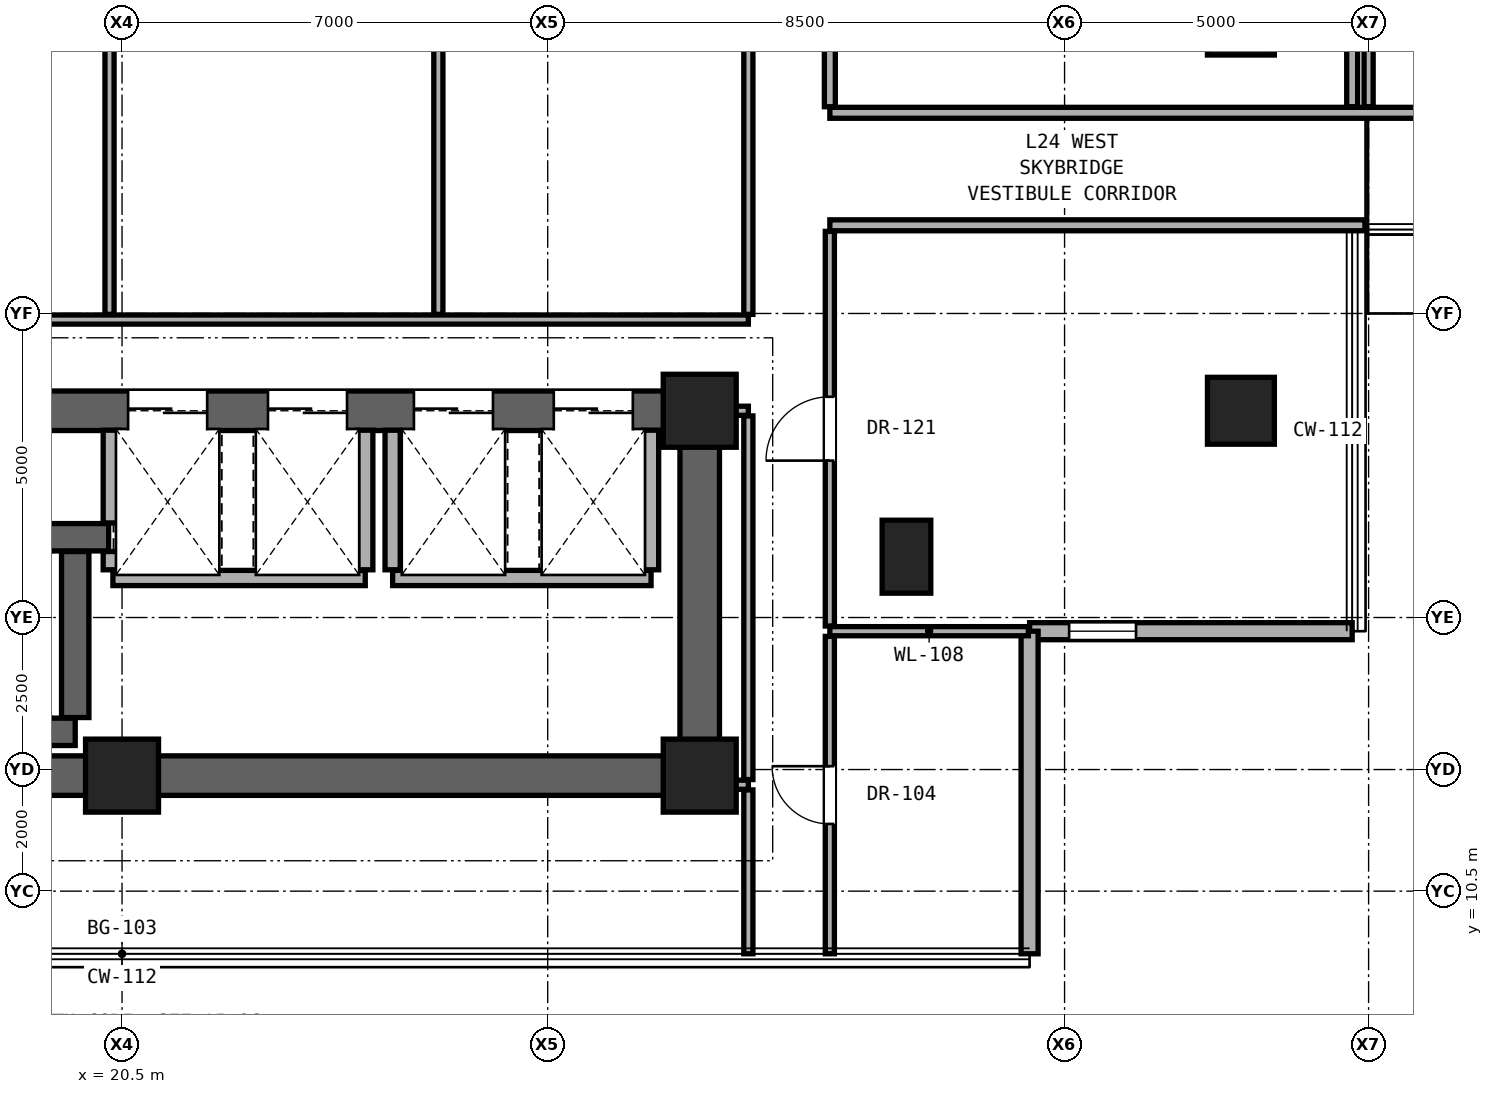
"""IFC4 building model, lengths in metres.
Left out: names, types, materials, properties, quantities, classifications, styles, units other than length and angle.
Written with IfcOpenShell. Run it as: python <this file> out.ifc"""

import sys

from ifc_helpers import new_model, si_unit, direction, frame, frame_2d, origin, origin_2d, place, context, subcontext, project, spatial, rectangle, hollow_rectangle, extrude, element, fill, save


model = new_model("IFC4")
c1 = context("Model", 3, precision=1e-05, world=origin(), true_north=direction((0.0, 1.0)))
c2 = subcontext(c1, "Body", "Model", "MODEL_VIEW")
j1 = project(units=[si_unit("LENGTHUNIT", "METRE"), si_unit("PLANEANGLEUNIT", "RADIAN")], contexts=[c1])
p1 = place(None, origin())
s1 = spatial("IfcSite", under=j1, at=p1, CompositionType="ELEMENT")
p2 = place(p1, origin())
s2 = spatial("IfcBuilding", under=s1, at=p2, CompositionType="ELEMENT")
p3 = place(p2, frame((0.0, 0.0, 88.4)))
s3 = spatial("IfcBuildingStorey", under=s2, at=p3, CompositionType="ELEMENT", Elevation=88.4)
for number, where, z_axis, x_axis in (
    (1, (20.5, 12.4, 0.0), (0.0, 0.0, 1.0), (1.0, 0.0, 0.0)),
    (2, (30.0, 12.4, 0.0), (0.0, 0.0, 1.0), (1.0, 0.0, 0.0)),
    (3, (30.0, 18.4, 0.0), (0.0, 0.0, 1.0), (1.0, 0.0, 0.0)),
):
    element("IfcColumn", number, at=place(p3, frame(where, z_axis=z_axis, x_axis=x_axis)), inside=s3, PredefinedType="COLUMN", context=c2, shape_type="SweptSolid", body=[
        extrude(rectangle(XDim=1.2, YDim=1.2, at=origin_2d()), origin(), (0.0, 0.0, 1.0), 3.3),
    ])
for number, where, z_axis, x_axis in (
    (4, (38.9, 18.4, 0.0), (0.0, 0.0, 1.0), (1.0, 0.0, 0.0)),
    (5, (38.9, 24.8, 0.0), (0.0, 0.0, 1.0), (1.0, 0.0, 0.0)),
):
    element("IfcColumn", number, at=place(p3, frame(where, z_axis=z_axis, x_axis=x_axis)), inside=s3, PredefinedType="COLUMN", context=c2, shape_type="SweptSolid", body=[
        extrude(hollow_rectangle(XDim=1.1, YDim=1.1, WallThickness=0.06, at=origin_2d()), origin(), (0.0, 0.0, 1.0), 3.3),
    ])
p4 = place(p3, frame((33.4, 16.0, 0.0), z_axis=(0.0, 0.0, 1.0), x_axis=(1.0, 0.0, 0.0)))
e6 = element("IfcColumn", 6, at=p4, inside=s3, PredefinedType="PILASTER", context=c2, shape_type="SweptSolid", body=[
    extrude(rectangle(XDim=0.8, YDim=1.2, at=origin_2d()), origin(), (0.0, 0.0, 1.0), 3.3),
])
p5 = place(p3, frame((11.0, 12.4, 0.0), z_axis=(0.0, 0.0, 1.0), x_axis=(1.0, 0.0, 0.0)))
e7 = element("IfcWall", 7, at=p5, inside=s3, PredefinedType="SHEAR", context=c2, shape_type="SweptSolid", body=[
    extrude(rectangle(XDim=19.0, YDim=0.65, at=frame_2d((9.5, 0.0))), origin(), (0.0, 0.0, 1.0), 3.08),
])
p6 = place(p3, frame((30.0, 12.4, 0.0), z_axis=(0.0, 0.0, 1.0), x_axis=(0.0, 1.0, 0.0)))
e8 = element("IfcWall", 8, at=p6, inside=s3, PredefinedType="SHEAR", context=c2, shape_type="SweptSolid", body=[
    extrude(rectangle(XDim=6.0, YDim=0.65, at=frame_2d((3.0, 0.0))), origin(), (0.0, 0.0, 1.0), 3.08),
])
p7 = place(p3, frame((11.0, 18.4, 0.0), z_axis=(0.0, 0.0, 1.0), x_axis=(1.0, 0.0, 0.0)))
e9 = element("IfcWall", 9, at=p7, inside=s3, PredefinedType="SHEAR", context=c2, shape_type="SweptSolid", body=[
    extrude(rectangle(XDim=19.0, YDim=0.65, at=frame_2d((9.5, 0.0))), origin(), (0.0, 0.0, 1.0), 3.08),
])
p8 = place(p7, frame((4.175, 0.0, 0.0)))
e10 = element("IfcOpeningElement", 10, at=p8, cuts=e9, PredefinedType="OPENING", context=c2, shape_type="SweptSolid", body=[
    extrude(rectangle(XDim=1.2, YDim=2.25, at=frame_2d((0.6, 1.125))), frame((0.0, 0.335, 0.0), z_axis=(0.0, -1.0, 0.0), x_axis=(1.0, 0.0, 0.0)), (0.0, 0.0, 1.0), 0.67),
])
p9 = place(p7, frame((9.6, 0.0, 0.0)))
e11 = element("IfcOpeningElement", 11, at=p9, cuts=e9, PredefinedType="OPENING", context=c2, shape_type="SweptSolid", body=[
    extrude(rectangle(XDim=1.3, YDim=2.3, at=frame_2d((0.65, 1.15))), frame((0.0, 0.335, 0.0), z_axis=(0.0, -1.0, 0.0), x_axis=(1.0, 0.0, 0.0)), (0.0, 0.0, 1.0), 0.67),
])
p10 = place(p7, frame((11.9, 0.0, 0.0)))
e12 = element("IfcOpeningElement", 12, at=p10, cuts=e9, PredefinedType="OPENING", context=c2, shape_type="SweptSolid", body=[
    extrude(rectangle(XDim=1.3, YDim=2.3, at=frame_2d((0.65, 1.15))), frame((0.0, 0.335, 0.0), z_axis=(0.0, -1.0, 0.0), x_axis=(1.0, 0.0, 0.0)), (0.0, 0.0, 1.0), 0.67),
])
p11 = place(p7, frame((14.3, 0.0, 0.0)))
e13 = element("IfcOpeningElement", 13, at=p11, cuts=e9, PredefinedType="OPENING", context=c2, shape_type="SweptSolid", body=[
    extrude(rectangle(XDim=1.3, YDim=2.3, at=frame_2d((0.65, 1.15))), frame((0.0, 0.335, 0.0), z_axis=(0.0, -1.0, 0.0), x_axis=(1.0, 0.0, 0.0)), (0.0, 0.0, 1.0), 0.67),
])
p12 = place(p7, frame((16.6, 0.0, 0.0)))
e14 = element("IfcOpeningElement", 14, at=p12, cuts=e9, PredefinedType="OPENING", context=c2, shape_type="SweptSolid", body=[
    extrude(rectangle(XDim=1.3, YDim=2.3, at=frame_2d((0.65, 1.15))), frame((0.0, 0.335, 0.0), z_axis=(0.0, -1.0, 0.0), x_axis=(1.0, 0.0, 0.0)), (0.0, 0.0, 1.0), 0.67),
])
p13 = place(p3, frame((35.425, 14.775, 0.0), z_axis=(0.0, 0.0, 1.0), x_axis=(1.0, 0.0, 0.0)))
e15 = element("IfcWall", 15, at=p13, inside=s3, PredefinedType="SOLIDWALL", context=c2, shape_type="SweptSolid", body=[
    extrude(rectangle(XDim=5.305, YDim=0.28, at=frame_2d((2.652, 0.0))), origin(), (0.0, 0.0, 1.0), 3.06),
])
p14 = place(p13, frame((0.65, 0.0, 0.85)))
e16 = element("IfcOpeningElement", 16, at=p14, cuts=e15, PredefinedType="OPENING", context=c2, shape_type="SweptSolid", body=[
    extrude(rectangle(XDim=1.1, YDim=2.0, at=frame_2d((0.55, 1.0))), frame((0.0, 0.15, 0.0), z_axis=(0.0, -1.0, 0.0), x_axis=(1.0, 0.0, 0.0)), (0.0, 0.0, 1.0), 0.3),
])
p15 = place(p3, frame((35.425, 9.47, 0.0), z_axis=(0.0, 0.0, 1.0), x_axis=(0.0, 1.0, 0.0)))
e17 = element("IfcWall", 17, at=p15, inside=s3, PredefinedType="SOLIDWALL", context=c2, shape_type="SweptSolid", body=[
    extrude(rectangle(XDim=5.305, YDim=0.28, at=frame_2d((2.652, 0.0))), origin(), (0.0, 0.0, 1.0), 3.06),
])
p16 = place(p3, frame((30.32, 12.25, 0.0), z_axis=(0.0, 0.0, 1.0), x_axis=(1.0, 0.0, 0.0)))
e18 = element("IfcWall", 18, at=p16, inside=s3, PredefinedType="PARTITIONING", context=c2, shape_type="SweptSolid", body=[
    extrude(rectangle(XDim=0.48, YDim=0.15, at=frame_2d((0.24, 0.0))), origin(), (0.0, 0.0, 1.0), 3.08),
])
p17 = place(p3, frame((11.32, 13.12, 0.0), z_axis=(0.0, 0.0, 1.0), x_axis=(1.0, 0.0, 0.0)))
e19 = element("IfcWall", 19, at=p17, inside=s3, PredefinedType="SHEAR", context=c2, shape_type="SweptSolid", body=[
    extrude(rectangle(XDim=8.41, YDim=0.45, at=frame_2d((4.205, 0.0))), origin(), (0.0, 0.0, 1.0), 3.08),
])
p18 = place(p3, frame((32.14, 14.775, 0.0), z_axis=(0.0, 0.0, 1.0), x_axis=(1.0, 0.0, 0.0)))
e20 = element("IfcWall", 20, at=p18, inside=s3, PredefinedType="PARTITIONING", context=c2, shape_type="SweptSolid", body=[
    extrude(rectangle(XDim=3.265, YDim=0.15, at=frame_2d((1.633, 0.0))), origin(), (0.0, 0.0, 1.0), 3.08),
])
p19 = place(p3, frame((20.35, 15.65, 0.0), z_axis=(0.0, 0.0, 1.0), x_axis=(1.0, 0.0, 0.0)))
e21 = element("IfcWall", 21, at=p19, inside=s3, PredefinedType="SOLIDWALL", context=c2, shape_type="SweptSolid", body=[
    extrude(rectangle(XDim=4.15, YDim=0.25, at=frame_2d((2.075, 0.0))), origin(), (0.0, 0.0, 1.0), 3.08),
])
p20 = place(p3, frame((24.95, 15.65, 0.0), z_axis=(0.0, 0.0, 1.0), x_axis=(1.0, 0.0, 0.0)))
e22 = element("IfcWall", 22, at=p20, inside=s3, PredefinedType="SOLIDWALL", context=c2, shape_type="SweptSolid", body=[
    extrude(rectangle(XDim=4.25, YDim=0.25, at=frame_2d((2.125, 0.0))), origin(), (0.0, 0.0, 1.0), 3.08),
])
p21 = place(p3, frame((11.32, 16.32, 0.0), z_axis=(0.0, 0.0, 1.0), x_axis=(1.0, 0.0, 0.0)))
e23 = element("IfcWall", 23, at=p21, inside=s3, PredefinedType="SHEAR", context=c2, shape_type="SweptSolid", body=[
    extrude(rectangle(XDim=8.96, YDim=0.45, at=frame_2d((4.48, 0.0))), origin(), (0.0, 0.0, 1.0), 3.08),
])
p22 = place(p21, frame((0.495, 0.0, 0.0)))
e24 = element("IfcOpeningElement", 24, at=p22, cuts=e23, PredefinedType="OPENING", context=c2, shape_type="SweptSolid", body=[
    extrude(rectangle(XDim=1.15, YDim=2.2, at=frame_2d((0.575, 1.1))), frame((0.0, 0.235, 0.0), z_axis=(0.0, -1.0, 0.0), x_axis=(1.0, 0.0, 0.0)), (0.0, 0.0, 1.0), 0.47),
])
p23 = place(p3, frame((30.32, 18.4, 0.0), z_axis=(0.0, 0.0, 1.0), x_axis=(1.0, 0.0, 0.0)))
e25 = element("IfcWall", 25, at=p23, inside=s3, PredefinedType="PARTITIONING", context=c2, shape_type="SweptSolid", body=[
    extrude(rectangle(XDim=0.48, YDim=0.15, at=frame_2d((0.24, 0.0))), origin(), (0.0, 0.0, 1.0), 2.456),
])
p24 = place(p3, frame((10.2, 19.9, 0.0), z_axis=(0.0, 0.0, 1.0), x_axis=(1.0, 0.0, 0.0)))
e26 = element("IfcWall", 26, at=p24, inside=s3, PredefinedType="PARTITIONING", context=c2, shape_type="SweptSolid", body=[
    extrude(rectangle(XDim=20.6, YDim=0.15, at=frame_2d((10.3, 0.0))), origin(), (0.0, 0.0, 1.0), 2.124),
])
p25 = place(p24, frame((1.67, 0.0, 0.0)))
e27 = element("IfcOpeningElement", 27, at=p25, cuts=e26, PredefinedType="OPENING", context=c2, shape_type="SweptSolid", body=[
    extrude(rectangle(XDim=0.9, YDim=2.1, at=frame_2d((0.45, 1.05))), frame((0.0, 0.085, 0.0), z_axis=(0.0, -1.0, 0.0), x_axis=(1.0, 0.0, 0.0)), (0.0, 0.0, 1.0), 0.17),
])
p26 = place(p24, frame((3.65, 0.0, 0.0)))
e28 = element("IfcOpeningElement", 28, at=p26, cuts=e26, PredefinedType="OPENING", context=c2, shape_type="SweptSolid", body=[
    extrude(rectangle(XDim=0.85, YDim=2.01, at=frame_2d((0.425, 1.005))), frame((0.0, 0.085, 0.0), z_axis=(0.0, -1.0, 0.0), x_axis=(1.0, 0.0, 0.0)), (0.0, 0.0, 1.0), 0.17),
])
p27 = place(p24, frame((7.197, 0.0, 0.0)))
e29 = element("IfcOpeningElement", 29, at=p27, cuts=e26, PredefinedType="OPENING", context=c2, shape_type="SweptSolid", body=[
    extrude(rectangle(XDim=0.85, YDim=2.01, at=frame_2d((0.425, 1.005))), frame((0.0, 0.085, 0.0), z_axis=(0.0, -1.0, 0.0), x_axis=(1.0, 0.0, 0.0)), (0.0, 0.0, 1.0), 0.17),
])
p28 = place(p3, frame((32.14, 21.45, 0.0), z_axis=(0.0, 0.0, 1.0), x_axis=(1.0, 0.0, 0.0)))
e30 = element("IfcWall", 30, at=p28, inside=s3, PredefinedType="PARTITIONING", context=c2, shape_type="SweptSolid", body=[
    extrude(rectangle(XDim=8.8, YDim=0.18, at=frame_2d((4.4, 0.0))), origin(), (0.0, 0.0, 1.0), 2.085),
])
p29 = place(p3, frame((32.14, 23.3, 0.0), z_axis=(0.0, 0.0, 1.0), x_axis=(1.0, 0.0, 0.0)))
e31 = element("IfcWall", 31, at=p29, inside=s3, PredefinedType="PARTITIONING", context=c2, shape_type="SweptSolid", body=[
    extrude(rectangle(XDim=33.11, YDim=0.18, at=frame_2d((16.555, 0.0))), origin(), (0.0, 0.0, 1.0), 2.145),
])
p30 = place(p29, frame((12.335, 0.0, 0.0)))
e32 = element("IfcOpeningElement", 32, at=p30, cuts=e31, PredefinedType="OPENING", context=c2, shape_type="SweptSolid", body=[
    extrude(rectangle(XDim=0.85, YDim=2.01, at=frame_2d((0.425, 1.005))), frame((0.0, 0.1, 0.0), z_axis=(0.0, -1.0, 0.0), x_axis=(1.0, 0.0, 0.0)), (0.0, 0.0, 1.0), 0.2),
])
p31 = place(p29, frame((19.504, 0.0, 0.0)))
e33 = element("IfcOpeningElement", 33, at=p31, cuts=e31, PredefinedType="OPENING", context=c2, shape_type="SweptSolid", body=[
    extrude(rectangle(XDim=0.85, YDim=2.01, at=frame_2d((0.425, 1.005))), frame((0.0, 0.1, 0.0), z_axis=(0.0, -1.0, 0.0), x_axis=(1.0, 0.0, 0.0)), (0.0, 0.0, 1.0), 0.2),
])
p32 = place(p29, frame((24.398, 0.0, 0.0)))
e34 = element("IfcOpeningElement", 34, at=p32, cuts=e31, PredefinedType="OPENING", context=c2, shape_type="SweptSolid", body=[
    extrude(rectangle(XDim=0.9, YDim=2.1, at=frame_2d((0.45, 1.05))), frame((0.0, 0.1, 0.0), z_axis=(0.0, -1.0, 0.0), x_axis=(1.0, 0.0, 0.0)), (0.0, 0.0, 1.0), 0.2),
])
p33 = place(p3, frame((19.73, 13.355, 0.0), z_axis=(0.0, 0.0, 1.0), x_axis=(0.0, 1.0, 0.0)))
e35 = element("IfcWall", 35, at=p33, inside=s3, PredefinedType="SHEAR", context=c2, shape_type="SweptSolid", body=[
    extrude(rectangle(XDim=2.73, YDim=0.45, at=frame_2d((1.365, 0.0))), origin(), (0.0, 0.0, 1.0), 3.08),
])
p34 = place(p3, frame((20.315, 15.785, 0.0), z_axis=(0.0, 0.0, 1.0), x_axis=(0.0, 1.0, 0.0)))
e36 = element("IfcWall", 36, at=p34, inside=s3, PredefinedType="SOLIDWALL", context=c2, shape_type="SweptSolid", body=[
    extrude(rectangle(XDim=0.3, YDim=0.25, at=frame_2d((0.15, 0.0))), origin(), (0.0, 0.0, 1.0), 3.08),
])
p35 = place(p3, frame((20.315, 16.555, 0.0), z_axis=(0.0, 0.0, 1.0), x_axis=(0.0, 1.0, 0.0)))
e37 = element("IfcWall", 37, at=p35, inside=s3, PredefinedType="SOLIDWALL", context=c2, shape_type="SweptSolid", body=[
    extrude(rectangle(XDim=1.525, YDim=0.25, at=frame_2d((0.763, 0.0))), origin(), (0.0, 0.0, 1.0), 3.08),
])
p36 = place(p3, frame((20.294, 19.985, 0.0), z_axis=(0.0, 0.0, 1.0), x_axis=(0.0, 1.0, 0.0)))
e38 = element("IfcWall", 38, at=p36, inside=s3, PredefinedType="PARTITIONING", context=c2, shape_type="SweptSolid", body=[
    extrude(rectangle(XDim=13.03, YDim=0.15, at=frame_2d((6.515, 0.0))), origin(), (0.0, 0.0, 1.0), 2.124),
])
for number, where, z_axis, x_axis in (
    (39, (24.5, 15.785, 0.0), (0.0, 0.0, 1.0), (0.0, 1.0, 0.0)),
    (40, (24.95, 15.785, 0.0), (0.0, 0.0, 1.0), (0.0, 1.0, 0.0)),
):
    element("IfcWall", number, at=place(p3, frame(where, z_axis=z_axis, x_axis=x_axis)), inside=s3, PredefinedType="SOLIDWALL", context=c2, shape_type="SweptSolid", body=[
        extrude(rectangle(XDim=2.295, YDim=0.25, at=frame_2d((1.147, 0.0))), origin(), (0.0, 0.0, 1.0), 3.08),
    ])
p37 = place(p3, frame((25.702, 19.985, 0.0), z_axis=(0.0, 0.0, 1.0), x_axis=(0.0, 1.0, 0.0)))
e41 = element("IfcWall", 41, at=p37, inside=s3, PredefinedType="PARTITIONING", context=c2, shape_type="SweptSolid", body=[
    extrude(rectangle(XDim=13.03, YDim=0.15, at=frame_2d((6.515, 0.0))), origin(), (0.0, 0.0, 1.0), 2.124),
])
p38 = place(p3, frame((29.2, 15.785, 0.0), z_axis=(0.0, 0.0, 1.0), x_axis=(0.0, 1.0, 0.0)))
e42 = element("IfcWall", 42, at=p38, inside=s3, PredefinedType="SOLIDWALL", context=c2, shape_type="SweptSolid", body=[
    extrude(rectangle(XDim=2.295, YDim=0.25, at=frame_2d((1.147, 0.0))), origin(), (0.0, 0.0, 1.0), 3.08),
])
p39 = place(p3, frame((30.8, 9.47, 0.0), z_axis=(0.0, 0.0, 1.0), x_axis=(0.0, 1.0, 0.0)))
e43 = element("IfcWall", 43, at=p39, inside=s3, PredefinedType="PARTITIONING", context=c2, shape_type="SweptSolid", body=[
    extrude(rectangle(XDim=2.695, YDim=0.15, at=frame_2d((1.348, 0.0))), origin(), (0.0, 0.0, 1.0), 3.08),
])
p40 = place(p3, frame((30.8, 12.335, 0.0), z_axis=(0.0, 0.0, 1.0), x_axis=(0.0, 1.0, 0.0)))
e44 = element("IfcWall", 44, at=p40, inside=s3, PredefinedType="PARTITIONING", context=c2, shape_type="SweptSolid", body=[
    extrude(rectangle(XDim=5.98, YDim=0.15, at=frame_2d((2.99, 0.0))), origin(), (0.0, 0.0, 1.0), 2.456),
])
p41 = place(p3, frame((30.8, 19.985, 0.0), z_axis=(0.0, 0.0, 1.0), x_axis=(0.0, 1.0, 0.0)))
e45 = element("IfcWall", 45, at=p41, inside=s3, PredefinedType="PARTITIONING", context=c2, shape_type="SweptSolid", body=[
    extrude(rectangle(XDim=13.03, YDim=0.15, at=frame_2d((6.515, 0.0))), origin(), (0.0, 0.0, 1.0), 2.299),
])
p42 = place(p3, frame((32.14, 9.47, 0.0), z_axis=(0.0, 0.0, 1.0), x_axis=(0.0, 1.0, 0.0)))
e46 = element("IfcWall", 46, at=p42, inside=s3, PredefinedType="PARTITIONING", context=c2, shape_type="SweptSolid", body=[
    extrude(rectangle(XDim=5.22, YDim=0.15, at=frame_2d((2.61, 0.0))), origin(), (0.0, 0.0, 1.0), 3.08),
])
p43 = place(p42, frame((2.135, 0.0, 0.0)))
e47 = element("IfcOpeningElement", 47, at=p43, cuts=e46, PredefinedType="OPENING", context=c2, shape_type="SweptSolid", body=[
    extrude(rectangle(XDim=0.95, YDim=2.15, at=frame_2d((0.475, 1.075))), frame((0.0, 0.085, 0.0), z_axis=(0.0, -1.0, 0.0), x_axis=(1.0, 0.0, 0.0)), (0.0, 0.0, 1.0), 0.17),
])
p44 = place(p3, frame((32.14, 14.86, 0.0), z_axis=(0.0, 0.0, 1.0), x_axis=(0.0, 1.0, 0.0)))
e48 = element("IfcWall", 48, at=p44, inside=s3, PredefinedType="PARTITIONING", context=c2, shape_type="SweptSolid", body=[
    extrude(rectangle(XDim=6.49, YDim=0.15, at=frame_2d((3.245, 0.0))), origin(), (0.0, 0.0, 1.0), 2.456),
])
p45 = place(p44, frame((2.72, 0.0, 0.0)))
e49 = element("IfcOpeningElement", 49, at=p45, cuts=e48, PredefinedType="OPENING", context=c2, shape_type="SweptSolid", body=[
    extrude(rectangle(XDim=1.05, YDim=2.2, at=frame_2d((0.525, 1.1))), frame((0.0, 0.085, 0.0), z_axis=(0.0, -1.0, 0.0), x_axis=(1.0, 0.0, 0.0)), (0.0, 0.0, 1.0), 0.17),
])
p46 = place(p3, frame((32.14, 23.4, 0.0), z_axis=(0.0, 0.0, 1.0), x_axis=(0.0, 1.0, 0.0)))
e50 = element("IfcWall", 50, at=p46, inside=s3, PredefinedType="PARTITIONING", context=c2, shape_type="SweptSolid", body=[
    extrude(rectangle(XDim=5.4, YDim=0.18, at=frame_2d((2.7, 0.0))), origin(), (0.0, 0.0, 1.0), 2.299),
])
p47 = place(p46, frame((2.175, 0.0, 0.0)))
e51 = element("IfcOpeningElement", 51, at=p47, cuts=e50, PredefinedType="OPENING", context=c2, shape_type="SweptSolid", body=[
    extrude(rectangle(XDim=1.05, YDim=2.2, at=frame_2d((0.525, 1.1))), frame((0.0, 0.1, 0.0), z_axis=(0.0, -1.0, 0.0), x_axis=(1.0, 0.0, 0.0)), (0.0, 0.0, 1.0), 0.2),
])
p48 = place(p3, frame((40.73, 23.4, 0.0), z_axis=(0.0, 0.0, 1.0), x_axis=(0.0, 1.0, 0.0)))
e52 = element("IfcWall", 52, at=p48, inside=s3, PredefinedType="PARTITIONING", context=c2, shape_type="SweptSolid", body=[
    extrude(rectangle(XDim=5.4, YDim=0.18, at=frame_2d((2.7, 0.0))), origin(), (0.0, 0.0, 1.0), 2.085),
])
p49 = place(p3, frame((41.0, 23.4, 0.0), z_axis=(0.0, 0.0, 1.0), x_axis=(0.0, 1.0, 0.0)))
e53 = element("IfcWall", 53, at=p49, inside=s3, PredefinedType="PARTITIONING", context=c2, shape_type="SweptSolid", body=[
    extrude(rectangle(XDim=9.065, YDim=0.15, at=frame_2d((4.533, 0.0))), origin(), (0.0, 0.0, 1.0), 2.085),
])
p50 = place(p14, origin())
e54 = element("IfcWindow", 54, at=p50, inside=s3, PartitioningType="SINGLE_PANEL", PredefinedType="WINDOW", context=c2, shape_type="SweptSolid", body=[
    extrude(rectangle(XDim=1.1, YDim=2.0, at=frame_2d((0.55, 1.0))), frame((0.0, 0.03, 0.0), z_axis=(0.0, -1.0, 0.0), x_axis=(1.0, 0.0, 0.0)), (0.0, 0.0, 1.0), 0.06),
])
fill(e16, e54)
p51 = place(p43, origin())
e55 = element("IfcDoor", 55, at=p51, inside=s3, OperationType="SINGLE_SWING_RIGHT", PredefinedType="DOOR", context=c2, shape_type="SweptSolid", body=[
    extrude(rectangle(XDim=0.95, YDim=2.15, at=frame_2d((0.475, 1.075))), frame((0.0, 0.025, 0.0), z_axis=(0.0, -1.0, 0.0), x_axis=(1.0, 0.0, 0.0)), (0.0, 0.0, 1.0), 0.05),
])
fill(e47, e55)
p52 = place(p45, origin())
e56 = element("IfcDoor", 56, at=p52, inside=s3, OperationType="SINGLE_SWING_LEFT", PredefinedType="DOOR", context=c2, shape_type="SweptSolid", body=[
    extrude(rectangle(XDim=1.05, YDim=2.2, at=frame_2d((0.525, 1.1))), frame((0.0, 0.025, 0.0), z_axis=(0.0, -1.0, 0.0), x_axis=(1.0, 0.0, 0.0)), (0.0, 0.0, 1.0), 0.05),
])
fill(e49, e56)
p53 = place(p9, origin())
e57 = element("IfcDoor", 57, at=p53, inside=s3, OperationType="DOUBLE_DOOR_SLIDING", PredefinedType="DOOR", context=c2, shape_type="SweptSolid", body=[
    extrude(rectangle(XDim=1.3, YDim=2.3, at=frame_2d((0.65, 1.15))), frame((0.0, 0.025, 0.0), z_axis=(0.0, -1.0, 0.0), x_axis=(1.0, 0.0, 0.0)), (0.0, 0.0, 1.0), 0.05),
])
fill(e11, e57)
p54 = place(p10, origin())
e58 = element("IfcDoor", 58, at=p54, inside=s3, OperationType="DOUBLE_DOOR_SLIDING", PredefinedType="DOOR", context=c2, shape_type="SweptSolid", body=[
    extrude(rectangle(XDim=1.3, YDim=2.3, at=frame_2d((0.65, 1.15))), frame((0.0, 0.025, 0.0), z_axis=(0.0, -1.0, 0.0), x_axis=(1.0, 0.0, 0.0)), (0.0, 0.0, 1.0), 0.05),
])
fill(e12, e58)
p55 = place(p11, origin())
e59 = element("IfcDoor", 59, at=p55, inside=s3, OperationType="DOUBLE_DOOR_SLIDING", PredefinedType="DOOR", context=c2, shape_type="SweptSolid", body=[
    extrude(rectangle(XDim=1.3, YDim=2.3, at=frame_2d((0.65, 1.15))), frame((0.0, 0.025, 0.0), z_axis=(0.0, -1.0, 0.0), x_axis=(1.0, 0.0, 0.0)), (0.0, 0.0, 1.0), 0.05),
])
fill(e13, e59)
p56 = place(p12, origin())
e60 = element("IfcDoor", 60, at=p56, inside=s3, OperationType="DOUBLE_DOOR_SLIDING", PredefinedType="DOOR", context=c2, shape_type="SweptSolid", body=[
    extrude(rectangle(XDim=1.3, YDim=2.3, at=frame_2d((0.65, 1.15))), frame((0.0, 0.025, 0.0), z_axis=(0.0, -1.0, 0.0), x_axis=(1.0, 0.0, 0.0)), (0.0, 0.0, 1.0), 0.05),
])
fill(e14, e60)
save(model, sys.argv[1])
